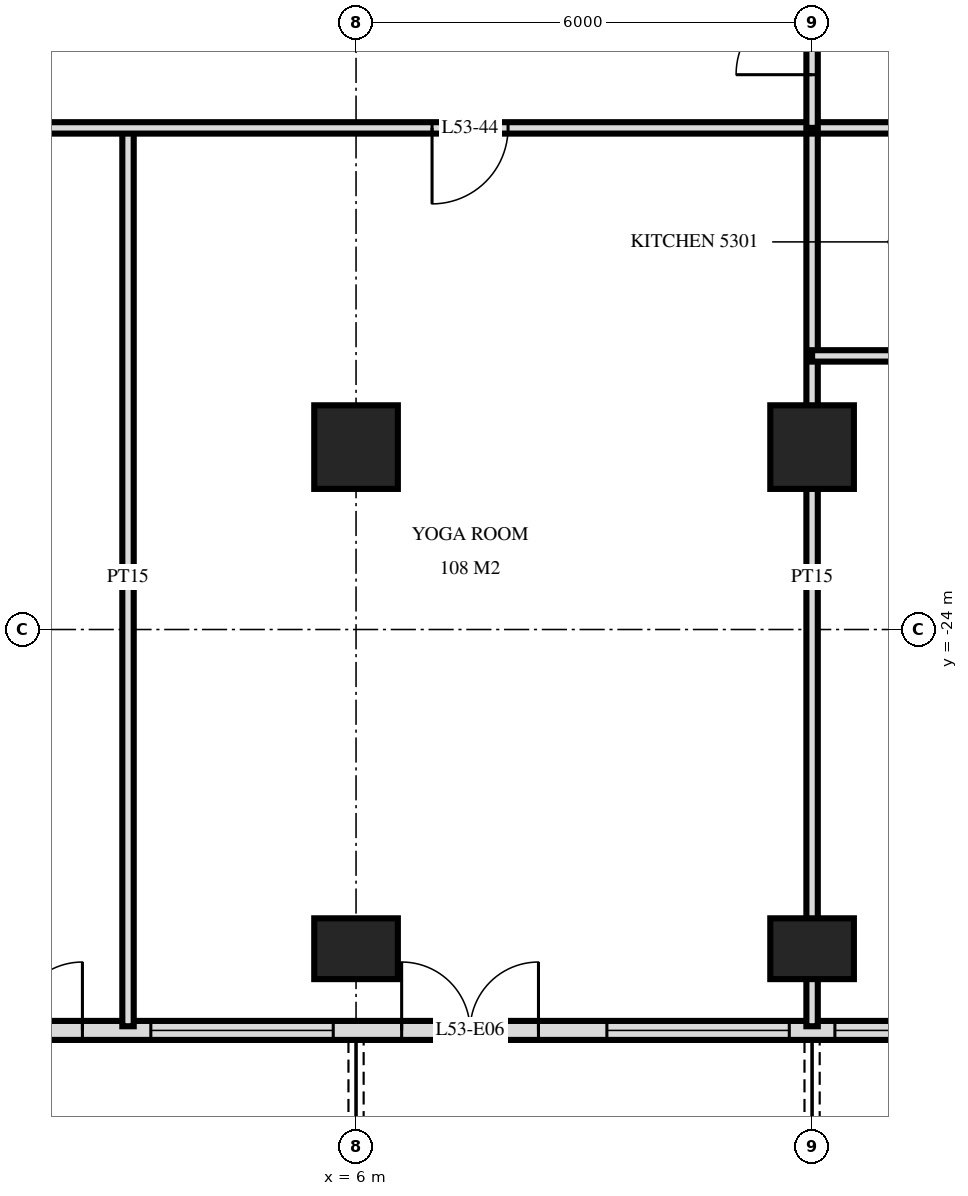
"""IFC4 building model, lengths in metres.
Left out: names, types, materials, properties, quantities, classifications, styles, units other than length and angle.
Written with IfcOpenShell. Run it as: python <this file> out.ifc"""

import sys

from ifc_helpers import new_model, si_unit, direction, frame, frame_2d, origin, origin_2d, place, context, subcontext, project, spatial, rectangle, extrude, element, fill, save


model = new_model("IFC4")
c1 = context("Model", 3, precision=1e-05, world=origin(), true_north=direction((0.0, 1.0)))
c2 = subcontext(c1, "Body", "Model", "MODEL_VIEW")
j1 = project(units=[si_unit("LENGTHUNIT", "METRE"), si_unit("PLANEANGLEUNIT", "RADIAN")], contexts=[c1])
p1 = place(None, origin())
s1 = spatial("IfcSite", under=j1, at=p1, CompositionType="ELEMENT")
p2 = place(p1, origin())
s2 = spatial("IfcBuilding", under=s1, at=p2, CompositionType="ELEMENT")
p3 = place(p2, frame((0.0, 0.0, 204.6)))
s3 = spatial("IfcBuildingStorey", under=s2, at=p3, CompositionType="ELEMENT", Elevation=204.6)
p4 = place(p3, frame((6.0, -28.2, 0.0), z_axis=(0.0, 0.0, 1.0), x_axis=(1.0, 0.0, 0.0)))
e1 = element("IfcColumn", 1, at=p4, inside=s3, PredefinedType="COLUMN", context=c2, shape_type="SweptSolid", body=[
    extrude(rectangle(XDim=1.1, YDim=0.8, at=origin_2d()), origin(), (0.0, 0.0, 1.0), 3.5),
])
p5 = place(p3, frame((6.0, -21.6, 0.0), z_axis=(0.0, 0.0, 1.0), x_axis=(1.0, 0.0, 0.0)))
e2 = element("IfcColumn", 2, at=p5, inside=s3, PredefinedType="COLUMN", context=c2, shape_type="SweptSolid", body=[
    extrude(rectangle(XDim=1.1, YDim=1.1, at=origin_2d()), origin(), (0.0, 0.0, 1.0), 3.5),
])
p6 = place(p3, frame((12.0, -28.2, 0.0), z_axis=(0.0, 0.0, 1.0), x_axis=(1.0, 0.0, 0.0)))
e3 = element("IfcColumn", 3, at=p6, inside=s3, PredefinedType="COLUMN", context=c2, shape_type="SweptSolid", body=[
    extrude(rectangle(XDim=1.1, YDim=0.8, at=origin_2d()), origin(), (0.0, 0.0, 1.0), 3.5),
])
p7 = place(p3, frame((12.0, -21.6, 0.0), z_axis=(0.0, 0.0, 1.0), x_axis=(1.0, 0.0, 0.0)))
e4 = element("IfcColumn", 4, at=p7, inside=s3, PredefinedType="COLUMN", context=c2, shape_type="SweptSolid", body=[
    extrude(rectangle(XDim=1.1, YDim=1.1, at=origin_2d()), origin(), (0.0, 0.0, 1.0), 3.5),
])
p8 = place(p3, frame((-22.475, -29.275, 0.0), z_axis=(0.0, 0.0, 1.0), x_axis=(1.0, 0.0, 0.0)))
e5 = element("IfcWall", 5, at=p8, inside=s3, PredefinedType="SOLIDWALL", context=c2, shape_type="SweptSolid", body=[
    extrude(rectangle(XDim=44.951, YDim=0.25, at=frame_2d((22.475, 0.0))), origin(), (0.0, 0.0, 1.0), 3.22),
])
p9 = place(p8, frame((0.575, 0.0, 0.0)))
e6 = element("IfcOpeningElement", 6, at=p9, cuts=e5, PredefinedType="OPENING", context=c2, shape_type="SweptSolid", body=[
    extrude(rectangle(XDim=1.8, YDim=2.4, at=frame_2d((0.9, 1.2))), frame((0.0, 0.135, 0.0), z_axis=(0.0, -1.0, 0.0), x_axis=(1.0, 0.0, 0.0)), (0.0, 0.0, 1.0), 0.27),
])
p10 = place(p8, frame((6.2, 0.0, 0.0)))
e7 = element("IfcOpeningElement", 7, at=p10, cuts=e5, PredefinedType="OPENING", context=c2, shape_type="SweptSolid", body=[
    extrude(rectangle(XDim=1.8, YDim=2.4, at=frame_2d((0.9, 1.2))), frame((0.0, 0.135, 0.0), z_axis=(0.0, -1.0, 0.0), x_axis=(1.0, 0.0, 0.0)), (0.0, 0.0, 1.0), 0.27),
])
p11 = place(p8, frame((8.45, 0.0, 0.9)))
e8 = element("IfcOpeningElement", 8, at=p11, cuts=e5, PredefinedType="OPENING", context=c2, shape_type="SweptSolid", body=[
    extrude(rectangle(XDim=1.8, YDim=1.5, at=frame_2d((0.9, 0.75))), frame((0.0, 0.135, 0.0), z_axis=(0.0, -1.0, 0.0), x_axis=(1.0, 0.0, 0.0)), (0.0, 0.0, 1.0), 0.27),
])
p12 = place(p8, frame((11.075, 0.0, 0.0)))
e9 = element("IfcOpeningElement", 9, at=p12, cuts=e5, PredefinedType="OPENING", context=c2, shape_type="SweptSolid", body=[
    extrude(rectangle(XDim=1.8, YDim=2.4, at=frame_2d((0.9, 1.2))), frame((0.0, 0.135, 0.0), z_axis=(0.0, -1.0, 0.0), x_axis=(1.0, 0.0, 0.0)), (0.0, 0.0, 1.0), 0.27),
])
p13 = place(p8, frame((13.775, 0.0, 0.9)))
e10 = element("IfcOpeningElement", 10, at=p13, cuts=e5, PredefinedType="OPENING", context=c2, shape_type="SweptSolid", body=[
    extrude(rectangle(XDim=2.4, YDim=1.5, at=frame_2d((1.2, 0.75))), frame((0.0, 0.135, 0.0), z_axis=(0.0, -1.0, 0.0), x_axis=(1.0, 0.0, 0.0)), (0.0, 0.0, 1.0), 0.27),
])
p14 = place(p8, frame((16.775, 0.0, 0.9)))
e11 = element("IfcOpeningElement", 11, at=p14, cuts=e5, PredefinedType="OPENING", context=c2, shape_type="SweptSolid", body=[
    extrude(rectangle(XDim=2.4, YDim=1.5, at=frame_2d((1.2, 0.75))), frame((0.0, 0.135, 0.0), z_axis=(0.0, -1.0, 0.0), x_axis=(1.0, 0.0, 0.0)), (0.0, 0.0, 1.0), 0.27),
])
p15 = place(p8, frame((20.075, 0.0, 0.0)))
e12 = element("IfcOpeningElement", 12, at=p15, cuts=e5, PredefinedType="OPENING", context=c2, shape_type="SweptSolid", body=[
    extrude(rectangle(XDim=1.8, YDim=2.4, at=frame_2d((0.9, 1.2))), frame((0.0, 0.135, 0.0), z_axis=(0.0, -1.0, 0.0), x_axis=(1.0, 0.0, 0.0)), (0.0, 0.0, 1.0), 0.27),
])
p16 = place(p8, frame((23.075, 0.0, 0.0)))
e13 = element("IfcOpeningElement", 13, at=p16, cuts=e5, PredefinedType="OPENING", context=c2, shape_type="SweptSolid", body=[
    extrude(rectangle(XDim=1.8, YDim=2.4, at=frame_2d((0.9, 1.2))), frame((0.0, 0.135, 0.0), z_axis=(0.0, -1.0, 0.0), x_axis=(1.0, 0.0, 0.0)), (0.0, 0.0, 1.0), 0.27),
])
p17 = place(p8, frame((25.775, 0.0, 0.9)))
e14 = element("IfcOpeningElement", 14, at=p17, cuts=e5, PredefinedType="OPENING", context=c2, shape_type="SweptSolid", body=[
    extrude(rectangle(XDim=2.4, YDim=1.5, at=frame_2d((1.2, 0.75))), frame((0.0, 0.135, 0.0), z_axis=(0.0, -1.0, 0.0), x_axis=(1.0, 0.0, 0.0)), (0.0, 0.0, 1.0), 0.27),
])
p18 = place(p8, frame((29.075, 0.0, 0.0)))
e15 = element("IfcOpeningElement", 15, at=p18, cuts=e5, PredefinedType="OPENING", context=c2, shape_type="SweptSolid", body=[
    extrude(rectangle(XDim=1.8, YDim=2.4, at=frame_2d((0.9, 1.2))), frame((0.0, 0.135, 0.0), z_axis=(0.0, -1.0, 0.0), x_axis=(1.0, 0.0, 0.0)), (0.0, 0.0, 1.0), 0.27),
])
p19 = place(p8, frame((31.775, 0.0, 0.9)))
e16 = element("IfcOpeningElement", 16, at=p19, cuts=e5, PredefinedType="OPENING", context=c2, shape_type="SweptSolid", body=[
    extrude(rectangle(XDim=2.4, YDim=1.5, at=frame_2d((1.2, 0.75))), frame((0.0, 0.135, 0.0), z_axis=(0.0, -1.0, 0.0), x_axis=(1.0, 0.0, 0.0)), (0.0, 0.0, 1.0), 0.27),
])
p20 = place(p8, frame((34.775, 0.0, 0.9)))
e17 = element("IfcOpeningElement", 17, at=p20, cuts=e5, PredefinedType="OPENING", context=c2, shape_type="SweptSolid", body=[
    extrude(rectangle(XDim=2.4, YDim=1.5, at=frame_2d((1.2, 0.75))), frame((0.0, 0.135, 0.0), z_axis=(0.0, -1.0, 0.0), x_axis=(1.0, 0.0, 0.0)), (0.0, 0.0, 1.0), 0.27),
])
p21 = place(p8, frame((38.075, 0.0, 0.0)))
e18 = element("IfcOpeningElement", 18, at=p21, cuts=e5, PredefinedType="OPENING", context=c2, shape_type="SweptSolid", body=[
    extrude(rectangle(XDim=1.8, YDim=2.4, at=frame_2d((0.9, 1.2))), frame((0.0, 0.135, 0.0), z_axis=(0.0, -1.0, 0.0), x_axis=(1.0, 0.0, 0.0)), (0.0, 0.0, 1.0), 0.27),
])
p22 = place(p8, frame((41.075, 0.0, 0.0)))
e19 = element("IfcOpeningElement", 19, at=p22, cuts=e5, PredefinedType="OPENING", context=c2, shape_type="SweptSolid", body=[
    extrude(rectangle(XDim=1.8, YDim=2.4, at=frame_2d((0.9, 1.2))), frame((0.0, 0.135, 0.0), z_axis=(0.0, -1.0, 0.0), x_axis=(1.0, 0.0, 0.0)), (0.0, 0.0, 1.0), 0.27),
])
p23 = place(p3, frame((12.0, -17.4, 0.0), z_axis=(0.0, 0.0, 1.0), x_axis=(0.0, 1.0, 0.0)))
e20 = element("IfcWall", 20, at=p23, inside=s3, PredefinedType="PARTITIONING", context=c2, shape_type="SweptSolid", body=[
    extrude(rectangle(XDim=2.35, YDim=0.15, at=frame_2d((1.175, 0.0))), origin(), (0.0, 0.0, 1.0), 3.22),
])
p24 = place(p23, frame((0.7, 0.0, 0.0)))
e21 = element("IfcOpeningElement", 21, at=p24, cuts=e20, PredefinedType="OPENING", context=c2, shape_type="SweptSolid", body=[
    extrude(rectangle(XDim=1.0, YDim=2.1, at=frame_2d((0.5, 1.05))), frame((0.0, 0.085, 0.0), z_axis=(0.0, -1.0, 0.0), x_axis=(1.0, 0.0, 0.0)), (0.0, 0.0, 1.0), 0.17),
])
for number, where, z_axis, x_axis in (
    (22, (12.0, -29.22, 0.0), (0.0, 0.0, 1.0), (0.0, 1.0, 0.0)),
    (23, (3.0, -29.22, 0.0), (0.0, 0.0, 1.0), (0.0, 1.0, 0.0)),
):
    element("IfcWall", number, at=place(p3, frame(where, z_axis=z_axis, x_axis=x_axis)), inside=s3, PredefinedType="PARTITIONING", context=c2, shape_type="SweptSolid", body=[
        extrude(rectangle(XDim=11.82, YDim=0.15, at=frame_2d((5.91, 0.0))), origin(), (0.0, 0.0, 1.0), 3.22),
    ])
p25 = place(p3, frame((12.0, -20.4, 0.0), z_axis=(0.0, 0.0, 1.0), x_axis=(1.0, 0.0, 0.0)))
e24 = element("IfcWall", 24, at=p25, inside=s3, PredefinedType="PARTITIONING", context=c2, shape_type="SweptSolid", body=[
    extrude(rectangle(XDim=2.1, YDim=0.15, at=frame_2d((1.05, 0.0))), origin(), (0.0, 0.0, 1.0), 3.22),
])
p26 = place(p3, frame((-26.82, -17.4, 0.0), z_axis=(0.0, 0.0, 1.0), x_axis=(1.0, 0.0, 0.0)))
e25 = element("IfcWall", 25, at=p26, inside=s3, PredefinedType="PARTITIONING", context=c2, shape_type="SweptSolid", body=[
    extrude(rectangle(XDim=53.64, YDim=0.15, at=frame_2d((26.82, 0.0))), origin(), (0.0, 0.0, 1.0), 3.22),
])
p27 = place(p26, frame((4.92, 0.0, 0.0)))
e26 = element("IfcOpeningElement", 26, at=p27, cuts=e25, PredefinedType="OPENING", context=c2, shape_type="SweptSolid", body=[
    extrude(rectangle(XDim=1.0, YDim=2.1, at=frame_2d((0.5, 1.05))), frame((0.0, 0.085, 0.0), z_axis=(0.0, -1.0, 0.0), x_axis=(1.0, 0.0, 0.0)), (0.0, 0.0, 1.0), 0.17),
])
p28 = place(p26, frame((1.62, 0.0, 0.0)))
e27 = element("IfcOpeningElement", 27, at=p28, cuts=e25, PredefinedType="OPENING", context=c2, shape_type="SweptSolid", body=[
    extrude(rectangle(XDim=1.0, YDim=2.1, at=frame_2d((0.5, 1.05))), frame((0.0, 0.085, 0.0), z_axis=(0.0, -1.0, 0.0), x_axis=(1.0, 0.0, 0.0)), (0.0, 0.0, 1.0), 0.17),
])
p29 = place(p26, frame((41.17, 0.0, 0.0)))
e28 = element("IfcOpeningElement", 28, at=p29, cuts=e25, PredefinedType="OPENING", context=c2, shape_type="SweptSolid", body=[
    extrude(rectangle(XDim=1.0, YDim=2.1, at=frame_2d((0.5, 1.05))), frame((0.0, 0.085, 0.0), z_axis=(0.0, -1.0, 0.0), x_axis=(1.0, 0.0, 0.0)), (0.0, 0.0, 1.0), 0.17),
])
p30 = place(p26, frame((49.42, 0.0, 0.0)))
e29 = element("IfcOpeningElement", 29, at=p30, cuts=e25, PredefinedType="OPENING", context=c2, shape_type="SweptSolid", body=[
    extrude(rectangle(XDim=1.0, YDim=2.1, at=frame_2d((0.5, 1.05))), frame((0.0, 0.085, 0.0), z_axis=(0.0, -1.0, 0.0), x_axis=(1.0, 0.0, 0.0)), (0.0, 0.0, 1.0), 0.17),
])
p31 = place(p26, frame((47.62, 0.0, 0.0)))
e30 = element("IfcOpeningElement", 30, at=p31, cuts=e25, PredefinedType="OPENING", context=c2, shape_type="SweptSolid", body=[
    extrude(rectangle(XDim=1.0, YDim=2.1, at=frame_2d((0.5, 1.05))), frame((0.0, 0.085, 0.0), z_axis=(0.0, -1.0, 0.0), x_axis=(1.0, 0.0, 0.0)), (0.0, 0.0, 1.0), 0.17),
])
p32 = place(p26, frame((21.82, 0.0, 0.0)))
e31 = element("IfcOpeningElement", 31, at=p32, cuts=e25, PredefinedType="OPENING", context=c2, shape_type="SweptSolid", body=[
    extrude(rectangle(XDim=1.0, YDim=2.1, at=frame_2d((0.5, 1.05))), frame((0.0, 0.085, 0.0), z_axis=(0.0, -1.0, 0.0), x_axis=(1.0, 0.0, 0.0)), (0.0, 0.0, 1.0), 0.17),
])
p33 = place(p26, frame((33.82, 0.0, 0.0)))
e32 = element("IfcOpeningElement", 32, at=p33, cuts=e25, PredefinedType="OPENING", context=c2, shape_type="SweptSolid", body=[
    extrude(rectangle(XDim=1.0, YDim=2.1, at=frame_2d((0.5, 1.05))), frame((0.0, 0.085, 0.0), z_axis=(0.0, -1.0, 0.0), x_axis=(1.0, 0.0, 0.0)), (0.0, 0.0, 1.0), 0.17),
])
p34 = place(p16, origin())
e33 = element("IfcDoor", 33, at=p34, inside=s3, OperationType="DOUBLE_DOOR_SINGLE_SWING", PredefinedType="DOOR", context=c2, shape_type="SweptSolid", body=[
    extrude(rectangle(XDim=1.8, YDim=2.4, at=frame_2d((0.9, 1.2))), frame((0.0, 0.025, 0.0), z_axis=(0.0, -1.0, 0.0), x_axis=(1.0, 0.0, 0.0)), (0.0, 0.0, 1.0), 0.05),
])
fill(e13, e33)
p35 = place(p17, origin())
e34 = element("IfcWindow", 34, at=p35, inside=s3, PartitioningType="SINGLE_PANEL", PredefinedType="WINDOW", context=c2, shape_type="SweptSolid", body=[
    extrude(rectangle(XDim=2.4, YDim=1.5, at=frame_2d((1.2, 0.75))), frame((0.0, 0.03, 0.0), z_axis=(0.0, -1.0, 0.0), x_axis=(1.0, 0.0, 0.0)), (0.0, 0.0, 1.0), 0.06),
])
fill(e14, e34)
p36 = place(p18, origin())
e35 = element("IfcDoor", 35, at=p36, inside=s3, OperationType="DOUBLE_DOOR_SINGLE_SWING", PredefinedType="DOOR", context=c2, shape_type="SweptSolid", body=[
    extrude(rectangle(XDim=1.8, YDim=2.4, at=frame_2d((0.9, 1.2))), frame((0.0, 0.025, 0.0), z_axis=(0.0, -1.0, 0.0), x_axis=(1.0, 0.0, 0.0)), (0.0, 0.0, 1.0), 0.05),
])
fill(e15, e35)
p37 = place(p19, origin())
e36 = element("IfcWindow", 36, at=p37, inside=s3, PartitioningType="SINGLE_PANEL", PredefinedType="WINDOW", context=c2, shape_type="SweptSolid", body=[
    extrude(rectangle(XDim=2.4, YDim=1.5, at=frame_2d((1.2, 0.75))), frame((0.0, 0.03, 0.0), z_axis=(0.0, -1.0, 0.0), x_axis=(1.0, 0.0, 0.0)), (0.0, 0.0, 1.0), 0.06),
])
fill(e16, e36)
p38 = place(p20, origin())
e37 = element("IfcWindow", 37, at=p38, inside=s3, PartitioningType="SINGLE_PANEL", PredefinedType="WINDOW", context=c2, shape_type="SweptSolid", body=[
    extrude(rectangle(XDim=2.4, YDim=1.5, at=frame_2d((1.2, 0.75))), frame((0.0, 0.03, 0.0), z_axis=(0.0, -1.0, 0.0), x_axis=(1.0, 0.0, 0.0)), (0.0, 0.0, 1.0), 0.06),
])
fill(e17, e37)
p39 = place(p24, origin())
e38 = element("IfcDoor", 38, at=p39, inside=s3, OperationType="SINGLE_SWING_RIGHT", PredefinedType="DOOR", context=c2, shape_type="SweptSolid", body=[
    extrude(rectangle(XDim=1.0, YDim=2.1, at=frame_2d((0.5, 1.05))), frame((0.0, 0.025, 0.0), z_axis=(0.0, -1.0, 0.0), x_axis=(1.0, 0.0, 0.0)), (0.0, 0.0, 1.0), 0.05),
])
fill(e21, e38)
p40 = place(p33, frame((0.5, 0.0, 0.0), z_axis=(0.0, 0.0, 1.0), x_axis=(-1.0, 0.0, 0.0)))
e39 = element("IfcDoor", 39, at=p40, inside=s3, OperationType="SINGLE_SWING_LEFT", PredefinedType="DOOR", context=c2, shape_type="SweptSolid", body=[
    extrude(rectangle(XDim=1.0, YDim=2.1, at=frame_2d((0.0, 1.05))), frame((0.0, -0.025, 0.0), z_axis=(0.0, 1.0, 0.0), x_axis=(-1.0, 0.0, 0.0)), (0.0, 0.0, 1.0), 0.05),
])
fill(e32, e39)
save(model, sys.argv[1])
